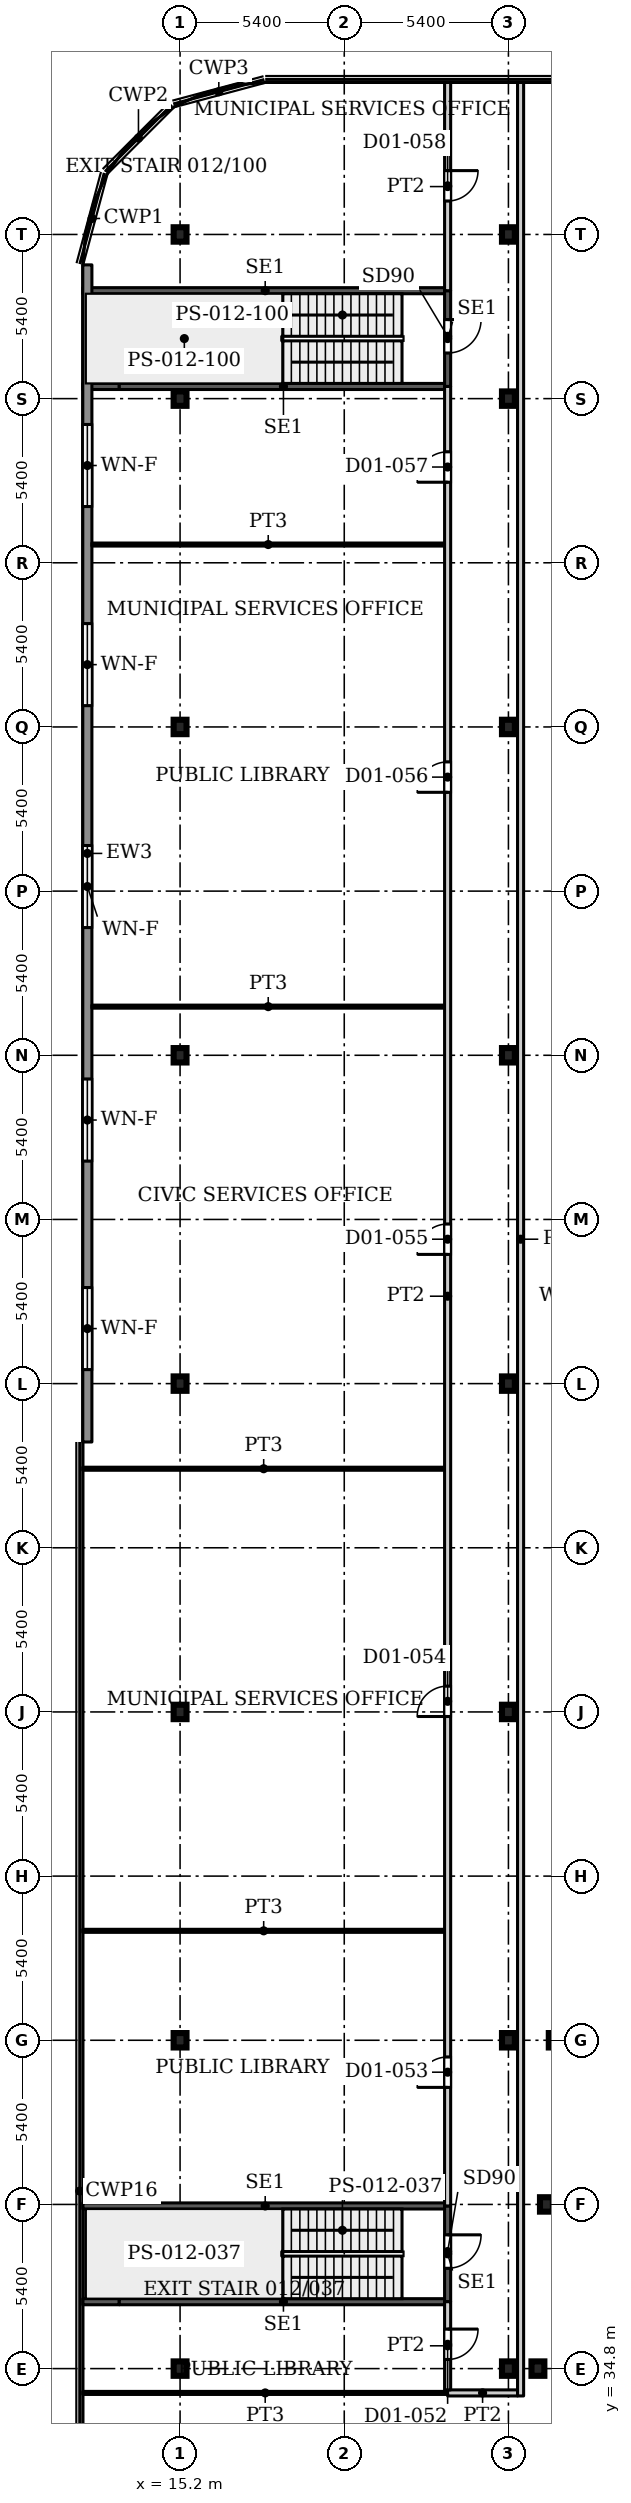
"""IFC4 building model, lengths in metres.
Left out: names, types, materials, properties, quantities, classifications, styles, units other than length and angle.
Written with IfcOpenShell. Run it as: python <this file> out.ifc"""

import sys

from ifc_helpers import new_model, si_unit, direction, frame, frame_2d, origin, origin_2d, place, context, subcontext, project, spatial, rectangle, i_section, extrude, source, transform, mapped, element, fill, save


model = new_model("IFC4")
c1 = context("Model", 3, precision=1e-05, world=origin(), true_north=direction((0.0, 1.0)))
c2 = subcontext(c1, "Body", "Model", "MODEL_VIEW")
j1 = project(units=[si_unit("LENGTHUNIT", "METRE"), si_unit("PLANEANGLEUNIT", "RADIAN")], contexts=[c1])
p1 = place(None, origin())
s1 = spatial("IfcSite", under=j1, at=p1, CompositionType="ELEMENT")
p2 = place(p1, origin())
s2 = spatial("IfcBuilding", under=s1, at=p2, CompositionType="ELEMENT")
p3 = place(p2, frame((0.0, 0.0, 7.5)))
s3 = spatial("IfcBuildingStorey", under=s2, at=p3, CompositionType="ELEMENT", Elevation=7.5)
for number, where, z_axis, x_axis in (
    (1, (15.2, 34.8, 0.0), (0.0, 0.0, 1.0), (1.0, 0.0, 0.0)),
    (2, (26.0, 34.8, 0.0), (0.0, 0.0, 1.0), (1.0, 0.0, 0.0)),
    (3, (15.2, 45.6, 0.0), (0.0, 0.0, 1.0), (1.0, 0.0, 0.0)),
    (4, (26.0, 45.6, 0.0), (0.0, 0.0, 1.0), (1.0, 0.0, 0.0)),
    (5, (15.2, 56.4, 0.0), (0.0, 0.0, 1.0), (1.0, 0.0, 0.0)),
    (6, (26.0, 56.4, 0.0), (0.0, 0.0, 1.0), (1.0, 0.0, 0.0)),
    (7, (15.2, 67.2, 0.0), (0.0, 0.0, 1.0), (1.0, 0.0, 0.0)),
    (8, (26.0, 67.2, 0.0), (0.0, 0.0, 1.0), (1.0, 0.0, 0.0)),
    (9, (15.2, 78.0, 0.0), (0.0, 0.0, 1.0), (1.0, 0.0, 0.0)),
    (10, (26.0, 78.0, 0.0), (0.0, 0.0, 1.0), (1.0, 0.0, 0.0)),
    (11, (15.2, 88.8, 0.0), (0.0, 0.0, 1.0), (1.0, 0.0, 0.0)),
    (12, (26.0, 88.8, 0.0), (0.0, 0.0, 1.0), (1.0, 0.0, 0.0)),
    (13, (15.2, 99.6, 0.0), (0.0, 0.0, 1.0), (1.0, 0.0, 0.0)),
    (14, (26.0, 99.6, 0.0), (0.0, 0.0, 1.0), (1.0, 0.0, 0.0)),
    (15, (15.2, 105.0, 0.0), (0.0, 0.0, 1.0), (1.0, 0.0, 0.0)),
    (16, (26.0, 105.0, 0.0), (0.0, 0.0, 1.0), (1.0, 0.0, 0.0)),
    (17, (26.97, 34.8, 0.0), (0.0, 0.0, 1.0), (1.0, 0.0, 0.0)),
    (18, (27.25, 40.2, 0.0), (0.0, 0.0, 1.0), (1.0, 0.0, 0.0)),
    (19, (27.54, 45.6, 0.0), (0.0, 0.0, 1.0), (1.0, 0.0, 0.0)),
):
    element("IfcColumn", number, at=place(p3, frame(where, z_axis=z_axis, x_axis=x_axis)), inside=s3, PredefinedType="COLUMN", context=c2, shape_type="SweptSolid", body=[
        extrude(i_section(OverallWidth=0.424, OverallDepth=0.474, WebThickness=0.048, FlangeThickness=0.077, FilletRadius=0.014, at=origin_2d()), origin(), (0.0, 0.0, 1.0), 5.0),
    ])
p4 = place(p3, frame((12.15, 65.28, 0.0), z_axis=(0.0, 0.0, 1.0), x_axis=(0.0, 1.0, 0.0)))
e20 = element("IfcWall", 20, at=p4, inside=s3, PredefinedType="SOLIDWALL", context=c2, shape_type="SweptSolid", body=[
    extrude(rectangle(XDim=38.72, YDim=0.3, at=frame_2d((19.36, 0.0))), origin(), (0.0, 0.0, 1.0), 4.75),
])
p5 = place(p4, frame((2.38, 0.0, 0.6)))
e21 = element("IfcOpeningElement", 21, at=p5, cuts=e20, PredefinedType="OPENING", context=c2, shape_type="SweptSolid", body=[
    extrude(rectangle(XDim=2.7, YDim=3.0, at=frame_2d((1.35, 1.5))), frame((0.0, 0.16, 0.0), z_axis=(0.0, -1.0, 0.0), x_axis=(1.0, 0.0, 0.0)), (0.0, 0.0, 1.0), 0.32),
])
p6 = place(p4, frame((9.24, 0.0, 0.6)))
e22 = element("IfcOpeningElement", 22, at=p6, cuts=e20, PredefinedType="OPENING", context=c2, shape_type="SweptSolid", body=[
    extrude(rectangle(XDim=2.7, YDim=3.0, at=frame_2d((1.35, 1.5))), frame((0.0, 0.16, 0.0), z_axis=(0.0, -1.0, 0.0), x_axis=(1.0, 0.0, 0.0)), (0.0, 0.0, 1.0), 0.32),
])
p7 = place(p4, frame((16.92, 0.0, 0.6)))
e23 = element("IfcOpeningElement", 23, at=p7, cuts=e20, PredefinedType="OPENING", context=c2, shape_type="SweptSolid", body=[
    extrude(rectangle(XDim=2.7, YDim=3.0, at=frame_2d((1.35, 1.5))), frame((0.0, 0.16, 0.0), z_axis=(0.0, -1.0, 0.0), x_axis=(1.0, 0.0, 0.0)), (0.0, 0.0, 1.0), 0.32),
])
p8 = place(p4, frame((24.22, 0.0, 0.6)))
e24 = element("IfcOpeningElement", 24, at=p8, cuts=e20, PredefinedType="OPENING", context=c2, shape_type="SweptSolid", body=[
    extrude(rectangle(XDim=2.7, YDim=3.0, at=frame_2d((1.35, 1.5))), frame((0.0, 0.16, 0.0), z_axis=(0.0, -1.0, 0.0), x_axis=(1.0, 0.0, 0.0)), (0.0, 0.0, 1.0), 0.32),
])
p9 = place(p4, frame((30.77, 0.0, 0.6)))
e25 = element("IfcOpeningElement", 25, at=p9, cuts=e20, PredefinedType="OPENING", context=c2, shape_type="SweptSolid", body=[
    extrude(rectangle(XDim=2.7, YDim=3.0, at=frame_2d((1.35, 1.5))), frame((0.0, 0.16, 0.0), z_axis=(0.0, -1.0, 0.0), x_axis=(1.0, 0.0, 0.0)), (0.0, 0.0, 1.0), 0.32),
])
p10 = place(p3, frame((12.0, 37.0, 0.0), z_axis=(0.0, 0.0, 1.0), x_axis=(1.0, 0.0, 0.0)))
e26 = element("IfcWall", 26, at=p10, inside=s3, PredefinedType="SHEAR", context=c2, shape_type="SweptSolid", body=[
    extrude(rectangle(XDim=1.2, YDim=0.2, at=frame_2d((0.6, 0.0))), origin(), (0.0, 0.0, 1.0), 5.0),
])
p11 = place(p3, frame((13.2, 37.0, 0.0), z_axis=(0.0, 0.0, 1.0), x_axis=(1.0, 0.0, 0.0)))
e27 = element("IfcWall", 27, at=p11, inside=s3, PredefinedType="SHEAR", context=c2, shape_type="SweptSolid", body=[
    extrude(rectangle(XDim=10.8, YDim=0.2, at=frame_2d((5.4, 0.0))), origin(), (0.0, 0.0, 1.0), 5.0),
])
p12 = place(p3, frame((12.0, 40.15, 0.0), z_axis=(0.0, 0.0, 1.0), x_axis=(1.0, 0.0, 0.0)))
e28 = element("IfcWall", 28, at=p12, inside=s3, PredefinedType="SHEAR", context=c2, shape_type="SweptSolid", body=[
    extrude(rectangle(XDim=12.0, YDim=0.2, at=frame_2d((6.0, 0.0))), origin(), (0.0, 0.0, 1.0), 5.0),
])
p13 = place(p3, frame((24.0, 37.0, 0.0), z_axis=(0.0, 0.0, 1.0), x_axis=(0.0, 1.0, 0.0)))
e29 = element("IfcWall", 29, at=p13, inside=s3, PredefinedType="SHEAR", context=c2, shape_type="SweptSolid", body=[
    extrude(rectangle(XDim=3.15, YDim=0.2, at=frame_2d((1.575, 0.0))), origin(), (0.0, 0.0, 1.0), 5.0),
])
p14 = place(p13, frame((1.1, 0.0, 0.0)))
e30 = element("IfcOpeningElement", 30, at=p14, cuts=e29, PredefinedType="OPENING", context=c2, shape_type="SweptSolid", body=[
    extrude(rectangle(XDim=1.1, YDim=2.2, at=frame_2d((0.55, 1.1))), frame((0.0, 0.11, 0.0), z_axis=(0.0, -1.0, 0.0), x_axis=(1.0, 0.0, 0.0)), (0.0, 0.0, 1.0), 0.22),
])
p15 = place(p3, frame((12.0, 100.0, 0.0), z_axis=(0.0, 0.0, 1.0), x_axis=(1.0, 0.0, 0.0)))
e31 = element("IfcWall", 31, at=p15, inside=s3, PredefinedType="SHEAR", context=c2, shape_type="SweptSolid", body=[
    extrude(rectangle(XDim=1.2, YDim=0.2, at=frame_2d((0.6, 0.0))), origin(), (0.0, 0.0, 1.0), 5.0),
])
p16 = place(p3, frame((13.2, 100.0, 0.0), z_axis=(0.0, 0.0, 1.0), x_axis=(1.0, 0.0, 0.0)))
e32 = element("IfcWall", 32, at=p16, inside=s3, PredefinedType="SHEAR", context=c2, shape_type="SweptSolid", body=[
    extrude(rectangle(XDim=10.8, YDim=0.2, at=frame_2d((5.4, 0.0))), origin(), (0.0, 0.0, 1.0), 5.0),
])
p17 = place(p3, frame((12.0, 103.15, 0.0), z_axis=(0.0, 0.0, 1.0), x_axis=(1.0, 0.0, 0.0)))
e33 = element("IfcWall", 33, at=p17, inside=s3, PredefinedType="SHEAR", context=c2, shape_type="SweptSolid", body=[
    extrude(rectangle(XDim=12.0, YDim=0.2, at=frame_2d((6.0, 0.0))), origin(), (0.0, 0.0, 1.0), 5.0),
])
p18 = place(p3, frame((24.0, 100.0, 0.0), z_axis=(0.0, 0.0, 1.0), x_axis=(0.0, 1.0, 0.0)))
e34 = element("IfcWall", 34, at=p18, inside=s3, PredefinedType="SHEAR", context=c2, shape_type="SweptSolid", body=[
    extrude(rectangle(XDim=3.15, YDim=0.2, at=frame_2d((1.575, 0.0))), origin(), (0.0, 0.0, 1.0), 5.0),
])
p19 = place(p18, frame((1.1, 0.0, 0.0)))
e35 = element("IfcOpeningElement", 35, at=p19, cuts=e34, PredefinedType="OPENING", context=c2, shape_type="SweptSolid", body=[
    extrude(rectangle(XDim=1.1, YDim=2.2, at=frame_2d((0.55, 1.1))), frame((0.0, 0.11, 0.0), z_axis=(0.0, -1.0, 0.0), x_axis=(1.0, 0.0, 0.0)), (0.0, 0.0, 1.0), 0.22),
])
p20 = place(p3, frame((12.0, 34.0, 0.0), z_axis=(0.0, 0.0, 1.0), x_axis=(1.0, 0.0, 0.0)))
e36 = element("IfcWall", 36, at=p20, inside=s3, PredefinedType="PARTITIONING", context=c2, shape_type="SweptSolid", body=[
    extrude(rectangle(XDim=12.0, YDim=0.1, at=frame_2d((6.0, 0.0))), origin(), (0.0, 0.0, 1.0), 4.68),
])
for number, where, z_axis, x_axis in (
    (37, (12.0, 49.2, 0.0), (0.0, 0.0, 1.0), (1.0, 0.0, 0.0)),
    (38, (12.0, 64.4, 0.0), (0.0, 0.0, 1.0), (1.0, 0.0, 0.0)),
):
    element("IfcWall", number, at=place(p3, frame(where, z_axis=z_axis, x_axis=x_axis)), inside=s3, PredefinedType="PARTITIONING", context=c2, shape_type="SweptSolid", body=[
        extrude(rectangle(XDim=11.9, YDim=0.1, at=frame_2d((5.95, 0.0))), origin(), (0.0, 0.0, 1.0), 4.68),
    ])
for number, where, z_axis, x_axis in (
    (39, (12.299, 79.6, 0.0), (0.0, 0.0, 1.0), (1.0, 0.0, 0.0)),
    (40, (12.299, 94.8, 0.0), (0.0, 0.0, 1.0), (1.0, 0.0, 0.0)),
):
    element("IfcWall", number, at=place(p3, frame(where, z_axis=z_axis, x_axis=x_axis)), inside=s3, PredefinedType="PARTITIONING", context=c2, shape_type="SweptSolid", body=[
        extrude(rectangle(XDim=11.601, YDim=0.1, at=frame_2d((5.8, 0.0))), origin(), (0.0, 0.0, 1.0), 4.68),
    ])
p21 = place(p3, frame((24.0, 34.0, 0.0), z_axis=(0.0, 0.0, 1.0), x_axis=(1.0, 0.0, 0.0)))
e41 = element("IfcWall", 41, at=p21, inside=s3, PredefinedType="PARTITIONING", context=c2, shape_type="SweptSolid", body=[
    extrude(rectangle(XDim=2.3, YDim=0.2, at=frame_2d((1.15, 0.0))), origin(), (0.0, 0.0, 1.0), 4.68),
])
p22 = place(p3, frame((24.0, 34.1, 0.0), z_axis=(0.0, 0.0, 1.0), x_axis=(0.0, 1.0, 0.0)))
e42 = element("IfcWall", 42, at=p22, inside=s3, PredefinedType="PARTITIONING", context=c2, shape_type="SweptSolid", body=[
    extrude(rectangle(XDim=2.9, YDim=0.2, at=frame_2d((1.45, 0.0))), origin(), (0.0, 0.0, 1.0), 4.68),
])
p23 = place(p22, frame((1.0, 0.0, 0.0)))
e43 = element("IfcOpeningElement", 43, at=p23, cuts=e42, PredefinedType="OPENING", context=c2, shape_type="SweptSolid", body=[
    extrude(rectangle(XDim=1.0, YDim=2.1, at=frame_2d((0.5, 1.05))), frame((0.0, 0.11, 0.0), z_axis=(0.0, -1.0, 0.0), x_axis=(1.0, 0.0, 0.0)), (0.0, 0.0, 1.0), 0.22),
])
p24 = place(p3, frame((24.0, 40.15, 0.0), z_axis=(0.0, 0.0, 1.0), x_axis=(0.0, 1.0, 0.0)))
e44 = element("IfcWall", 44, at=p24, inside=s3, PredefinedType="PARTITIONING", context=c2, shape_type="SweptSolid", body=[
    extrude(rectangle(XDim=59.85, YDim=0.2, at=frame_2d((29.925, 0.0))), origin(), (0.0, 0.0, 1.0), 4.68),
])
p25 = place(p24, frame((3.9, 0.0, 0.0)))
e45 = element("IfcOpeningElement", 45, at=p25, cuts=e44, PredefinedType="OPENING", context=c2, shape_type="SweptSolid", body=[
    extrude(rectangle(XDim=1.0, YDim=2.1, at=frame_2d((0.5, 1.05))), frame((0.0, 0.11, 0.0), z_axis=(0.0, -1.0, 0.0), x_axis=(1.0, 0.0, 0.0)), (0.0, 0.0, 1.0), 0.22),
])
p26 = place(p24, frame((16.1, 0.0, 0.0)))
e46 = element("IfcOpeningElement", 46, at=p26, cuts=e44, PredefinedType="OPENING", context=c2, shape_type="SweptSolid", body=[
    extrude(rectangle(XDim=1.0, YDim=2.1, at=frame_2d((0.5, 1.05))), frame((0.0, 0.11, 0.0), z_axis=(0.0, -1.0, 0.0), x_axis=(1.0, 0.0, 0.0)), (0.0, 0.0, 1.0), 0.22),
])
p27 = place(p24, frame((31.3, 0.0, 0.0)))
e47 = element("IfcOpeningElement", 47, at=p27, cuts=e44, PredefinedType="OPENING", context=c2, shape_type="SweptSolid", body=[
    extrude(rectangle(XDim=1.0, YDim=2.1, at=frame_2d((0.5, 1.05))), frame((0.0, 0.11, 0.0), z_axis=(0.0, -1.0, 0.0), x_axis=(1.0, 0.0, 0.0)), (0.0, 0.0, 1.0), 0.22),
])
p28 = place(p24, frame((46.5, 0.0, 0.0)))
e48 = element("IfcOpeningElement", 48, at=p28, cuts=e44, PredefinedType="OPENING", context=c2, shape_type="SweptSolid", body=[
    extrude(rectangle(XDim=1.0, YDim=2.1, at=frame_2d((0.5, 1.05))), frame((0.0, 0.11, 0.0), z_axis=(0.0, -1.0, 0.0), x_axis=(1.0, 0.0, 0.0)), (0.0, 0.0, 1.0), 0.22),
])
p29 = place(p24, frame((56.7, 0.0, 0.0)))
e49 = element("IfcOpeningElement", 49, at=p29, cuts=e44, PredefinedType="OPENING", context=c2, shape_type="SweptSolid", body=[
    extrude(rectangle(XDim=1.0, YDim=2.1, at=frame_2d((0.5, 1.05))), frame((0.0, 0.11, 0.0), z_axis=(0.0, -1.0, 0.0), x_axis=(1.0, 0.0, 0.0)), (0.0, 0.0, 1.0), 0.22),
])
p30 = place(p3, frame((24.0, 103.15, 0.0), z_axis=(0.0, 0.0, 1.0), x_axis=(0.0, 1.0, 0.0)))
e50 = element("IfcWall", 50, at=p30, inside=s3, PredefinedType="PARTITIONING", context=c2, shape_type="SweptSolid", body=[
    extrude(rectangle(XDim=6.85, YDim=0.2, at=frame_2d((3.425, 0.0))), origin(), (0.0, 0.0, 1.0), 4.68),
])
p31 = place(p30, frame((2.95, 0.0, 0.0)))
e51 = element("IfcOpeningElement", 51, at=p31, cuts=e50, PredefinedType="OPENING", context=c2, shape_type="SweptSolid", body=[
    extrude(rectangle(XDim=1.0, YDim=2.1, at=frame_2d((0.5, 1.05))), frame((0.0, 0.11, 0.0), z_axis=(0.0, -1.0, 0.0), x_axis=(1.0, 0.0, 0.0)), (0.0, 0.0, 1.0), 0.22),
])
p32 = place(p3, frame((26.4, 33.9, 0.0), z_axis=(0.0, 0.0, 1.0), x_axis=(0.0, 1.0, 0.0)))
e52 = element("IfcWall", 52, at=p32, inside=s3, PredefinedType="PARTITIONING", context=c2, shape_type="SweptSolid", body=[
    extrude(rectangle(XDim=76.1, YDim=0.2, at=frame_2d((38.05, 0.0))), origin(), (0.0, 0.0, 1.0), 4.68),
])
m1 = source(origin(), c2, "Body", "SweptSolid", [
    extrude(rectangle(XDim=2.7, YDim=3.0, at=frame_2d((1.35, 1.5))), frame((0.0, 0.03, 0.0), z_axis=(0.0, -1.0, 0.0), x_axis=(1.0, 0.0, 0.0)), (0.0, 0.0, 1.0), 0.06),
])
p33 = place(p5, origin())
e53 = element("IfcWindow", 53, at=p33, inside=s3, PartitioningType="SINGLE_PANEL", PredefinedType="WINDOW", context=c2, shape_type="MappedRepresentation", body=[
    mapped(m1, transform((0.0, 0.0, 0.0), x_axis=(1.0, 0.0, 0.0), y_axis=(0.0, 1.0, 0.0), z_axis=(0.0, 0.0, 1.0), scale=1.0)),
])
fill(e21, e53)
p34 = place(p6, origin())
e54 = element("IfcWindow", 54, at=p34, inside=s3, PartitioningType="SINGLE_PANEL", PredefinedType="WINDOW", context=c2, shape_type="MappedRepresentation", body=[
    mapped(m1, transform((0.0, 0.0, 0.0), x_axis=(1.0, 0.0, 0.0), y_axis=(0.0, 1.0, 0.0), z_axis=(0.0, 0.0, 1.0), scale=1.0)),
])
fill(e22, e54)
p35 = place(p7, origin())
e55 = element("IfcWindow", 55, at=p35, inside=s3, PartitioningType="SINGLE_PANEL", PredefinedType="WINDOW", context=c2, shape_type="MappedRepresentation", body=[
    mapped(m1, transform((0.0, 0.0, 0.0), x_axis=(1.0, 0.0, 0.0), y_axis=(0.0, 1.0, 0.0), z_axis=(0.0, 0.0, 1.0), scale=1.0)),
])
fill(e23, e55)
p36 = place(p8, origin())
e56 = element("IfcWindow", 56, at=p36, inside=s3, PartitioningType="SINGLE_PANEL", PredefinedType="WINDOW", context=c2, shape_type="MappedRepresentation", body=[
    mapped(m1, transform((0.0, 0.0, 0.0), x_axis=(1.0, 0.0, 0.0), y_axis=(0.0, 1.0, 0.0), z_axis=(0.0, 0.0, 1.0), scale=1.0)),
])
fill(e24, e56)
p37 = place(p9, origin())
e57 = element("IfcWindow", 57, at=p37, inside=s3, PartitioningType="SINGLE_PANEL", PredefinedType="WINDOW", context=c2, shape_type="MappedRepresentation", body=[
    mapped(m1, transform((0.0, 0.0, 0.0), x_axis=(1.0, 0.0, 0.0), y_axis=(0.0, 1.0, 0.0), z_axis=(0.0, 0.0, 1.0), scale=1.0)),
])
fill(e25, e57)
m2 = source(origin(), c2, "Body", "SweptSolid", [
    extrude(rectangle(XDim=1.1, YDim=2.2, at=frame_2d((0.55, 1.1))), frame((0.0, 0.025, 0.0), z_axis=(0.0, -1.0, 0.0), x_axis=(1.0, 0.0, 0.0)), (0.0, 0.0, 1.0), 0.05),
])
p38 = place(p14, origin())
e58 = element("IfcDoor", 58, at=p38, inside=s3, OperationType="SINGLE_SWING_RIGHT", PredefinedType="DOOR", context=c2, shape_type="MappedRepresentation", body=[
    mapped(m2, transform((0.0, 0.0, 0.0), x_axis=(1.0, 0.0, 0.0), y_axis=(0.0, 1.0, 0.0), z_axis=(0.0, 0.0, 1.0), scale=1.0)),
])
fill(e30, e58)
p39 = place(p19, origin())
e59 = element("IfcDoor", 59, at=p39, inside=s3, OperationType="SINGLE_SWING_RIGHT", PredefinedType="DOOR", context=c2, shape_type="MappedRepresentation", body=[
    mapped(m2, transform((0.0, 0.0, 0.0), x_axis=(1.0, 0.0, 0.0), y_axis=(0.0, 1.0, 0.0), z_axis=(0.0, 0.0, 1.0), scale=1.0)),
])
fill(e35, e59)
m3 = source(origin(), c2, "Body", "SweptSolid", [
    extrude(rectangle(XDim=1.0, YDim=2.1, at=frame_2d((0.5, 1.05))), frame((0.0, 0.025, 0.0), z_axis=(0.0, -1.0, 0.0), x_axis=(1.0, 0.0, 0.0)), (0.0, 0.0, 1.0), 0.05),
])
p40 = place(p23, origin())
e60 = element("IfcDoor", 60, at=p40, inside=s3, OperationType="SINGLE_SWING_RIGHT", PredefinedType="DOOR", context=c2, shape_type="MappedRepresentation", body=[
    mapped(m3, transform((0.0, 0.0, 0.0), x_axis=(1.0, 0.0, 0.0), y_axis=(0.0, 1.0, 0.0), z_axis=(0.0, 0.0, 1.0), scale=1.0)),
])
fill(e43, e60)
p41 = place(p25, origin())
e61 = element("IfcDoor", 61, at=p41, inside=s3, OperationType="SINGLE_SWING_LEFT", PredefinedType="DOOR", context=c2, shape_type="MappedRepresentation", body=[
    mapped(m3, transform((0.0, 0.0, 0.0), x_axis=(1.0, 0.0, 0.0), y_axis=(0.0, 1.0, 0.0), z_axis=(0.0, 0.0, 1.0), scale=1.0)),
])
fill(e45, e61)
p42 = place(p26, origin())
e62 = element("IfcDoor", 62, at=p42, inside=s3, OperationType="SINGLE_SWING_LEFT", PredefinedType="DOOR", context=c2, shape_type="MappedRepresentation", body=[
    mapped(m3, transform((0.0, 0.0, 0.0), x_axis=(1.0, 0.0, 0.0), y_axis=(0.0, 1.0, 0.0), z_axis=(0.0, 0.0, 1.0), scale=1.0)),
])
fill(e46, e62)
p43 = place(p27, origin())
e63 = element("IfcDoor", 63, at=p43, inside=s3, OperationType="SINGLE_SWING_LEFT", PredefinedType="DOOR", context=c2, shape_type="MappedRepresentation", body=[
    mapped(m3, transform((0.0, 0.0, 0.0), x_axis=(1.0, 0.0, 0.0), y_axis=(0.0, 1.0, 0.0), z_axis=(0.0, 0.0, 1.0), scale=1.0)),
])
fill(e47, e63)
p44 = place(p28, origin())
e64 = element("IfcDoor", 64, at=p44, inside=s3, OperationType="SINGLE_SWING_LEFT", PredefinedType="DOOR", context=c2, shape_type="MappedRepresentation", body=[
    mapped(m3, transform((0.0, 0.0, 0.0), x_axis=(1.0, 0.0, 0.0), y_axis=(0.0, 1.0, 0.0), z_axis=(0.0, 0.0, 1.0), scale=1.0)),
])
fill(e48, e64)
p45 = place(p29, origin())
e65 = element("IfcDoor", 65, at=p45, inside=s3, OperationType="SINGLE_SWING_LEFT", PredefinedType="DOOR", context=c2, shape_type="MappedRepresentation", body=[
    mapped(m3, transform((0.0, 0.0, 0.0), x_axis=(1.0, 0.0, 0.0), y_axis=(0.0, 1.0, 0.0), z_axis=(0.0, 0.0, 1.0), scale=1.0)),
])
fill(e49, e65)
p46 = place(p31, origin())
e66 = element("IfcDoor", 66, at=p46, inside=s3, OperationType="SINGLE_SWING_RIGHT", PredefinedType="DOOR", context=c2, shape_type="MappedRepresentation", body=[
    mapped(m3, transform((0.0, 0.0, 0.0), x_axis=(1.0, 0.0, 0.0), y_axis=(0.0, 1.0, 0.0), z_axis=(0.0, 0.0, 1.0), scale=1.0)),
])
fill(e51, e66)
save(model, sys.argv[1])
